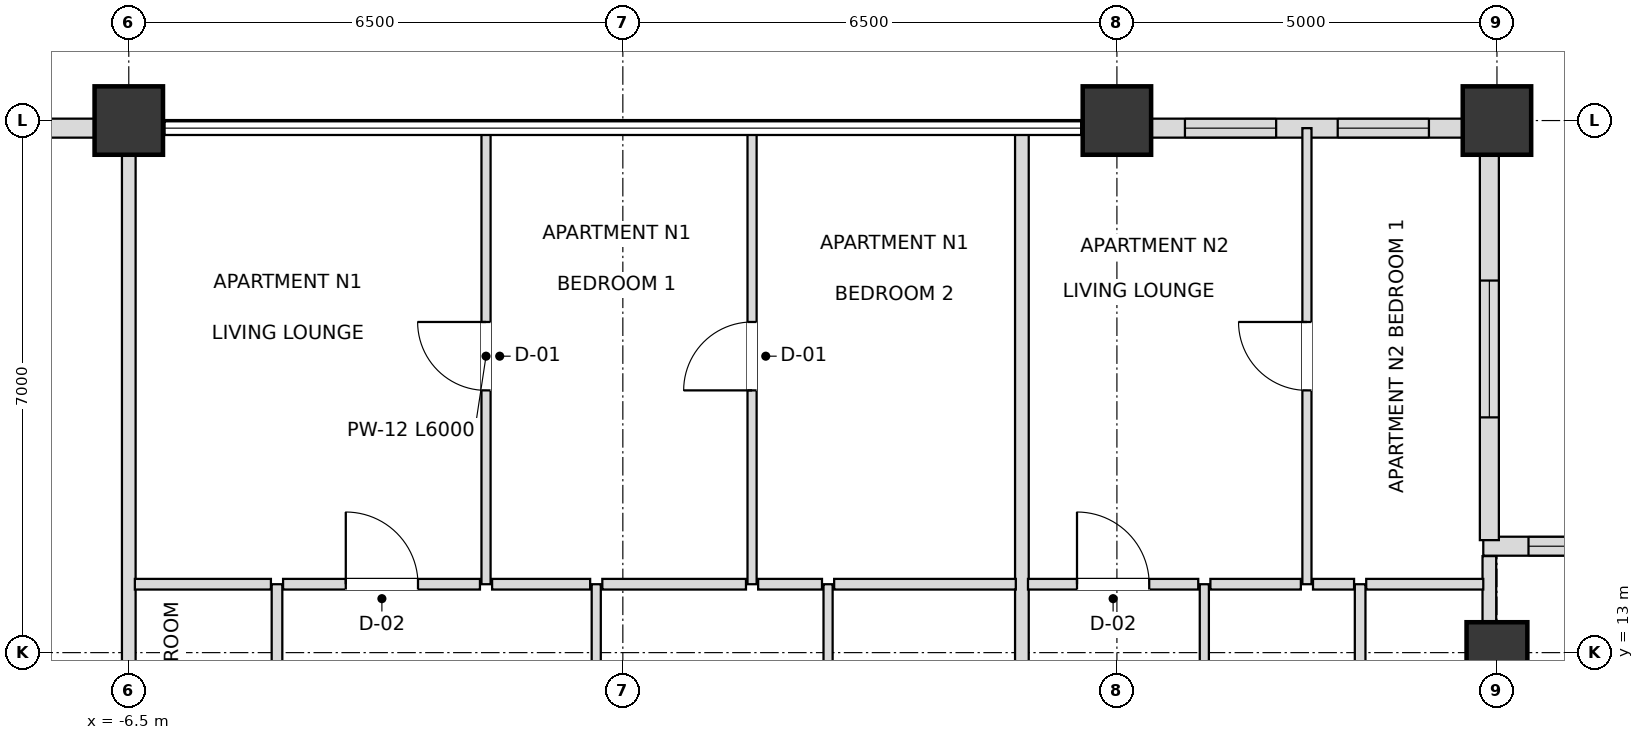
"""IFC4 building model, lengths in metres.
Left out: names, types, materials, properties, quantities, classifications, styles, units other than length and angle.
Written with IfcOpenShell. Run it as: python <this file> out.ifc"""

import sys

from ifc_helpers import new_model, si_unit, direction, frame, frame_2d, origin, origin_2d, place, context, subcontext, project, spatial, rectangle, extrude, element, fill, save


model = new_model("IFC4")
c1 = context("Model", 3, precision=1e-05, world=origin(), true_north=direction((0.0, 1.0)))
c2 = subcontext(c1, "Body", "Model", "MODEL_VIEW")
j1 = project(units=[si_unit("LENGTHUNIT", "METRE"), si_unit("PLANEANGLEUNIT", "RADIAN")], contexts=[c1])
p1 = place(None, origin())
s1 = spatial("IfcSite", under=j1, at=p1, CompositionType="ELEMENT")
p2 = place(p1, origin())
s2 = spatial("IfcBuilding", under=s1, at=p2, CompositionType="ELEMENT")
p3 = place(p2, frame((0.0, 0.0, 279.9)))
s3 = spatial("IfcBuildingStorey", under=s2, at=p3, CompositionType="ELEMENT", Elevation=279.9)
for number, where, z_axis, x_axis in (
    (1, (11.5, 20.0, 0.0), (0.0, 0.0, 1.0), (1.0, 0.0, 0.0)),
    (2, (6.5, 20.0, 0.0), (0.0, 0.0, 1.0), (1.0, 0.0, 0.0)),
    (3, (-6.5, 20.0, 0.0), (0.0, 0.0, 1.0), (1.0, 0.0, 0.0)),
):
    element("IfcColumn", number, at=place(p3, frame(where, z_axis=z_axis, x_axis=x_axis)), inside=s3, PredefinedType="USERDEFINED", context=c2, shape_type="SweptSolid", body=[
        extrude(rectangle(XDim=0.9, YDim=0.9, at=origin_2d()), origin(), (0.0, 0.0, 1.0), 3.6),
    ])
p4 = place(p3, frame((11.5, 13.0, 0.0), z_axis=(0.0, 0.0, 1.0), x_axis=(1.0, 0.0, 0.0)))
e4 = element("IfcColumn", 4, at=p4, inside=s3, PredefinedType="COLUMN", context=c2, shape_type="SweptSolid", body=[
    extrude(rectangle(XDim=0.8, YDim=0.8, at=origin_2d()), origin(), (0.0, 0.0, 1.0), 3.6),
])
p5 = place(p3, frame((11.055, 19.9, 0.0), z_axis=(0.0, 0.0, 1.0), x_axis=(-1.0, 0.0, 0.0)))
e5 = element("IfcWall", 5, at=p5, inside=s3, PredefinedType="SOLIDWALL", context=c2, shape_type="SweptSolid", body=[
    extrude(rectangle(XDim=4.11, YDim=0.25, at=frame_2d((2.055, 0.0))), origin(), (0.0, 0.0, 1.0), 2.748),
])
p6 = place(p5, frame((0.45, 0.0, 0.72)))
e6 = element("IfcOpeningElement", 6, at=p6, cuts=e5, PredefinedType="OPENING", context=c2, shape_type="SweptSolid", body=[
    extrude(rectangle(XDim=1.2, YDim=1.68, at=frame_2d((0.6, 0.84))), frame((0.0, 0.135, 0.0), z_axis=(0.0, -1.0, 0.0), x_axis=(1.0, 0.0, 0.0)), (0.0, 0.0, 1.0), 0.27),
])
p7 = place(p5, frame((2.46, 0.0, 0.72)))
e7 = element("IfcOpeningElement", 7, at=p7, cuts=e5, PredefinedType="OPENING", context=c2, shape_type="SweptSolid", body=[
    extrude(rectangle(XDim=1.2, YDim=1.68, at=frame_2d((0.6, 0.84))), frame((0.0, 0.135, 0.0), z_axis=(0.0, -1.0, 0.0), x_axis=(1.0, 0.0, 0.0)), (0.0, 0.0, 1.0), 0.27),
])
p8 = place(p3, frame((-6.945, 19.9, 0.0), z_axis=(0.0, 0.0, 1.0), x_axis=(-1.0, 0.0, 0.0)))
e8 = element("IfcWall", 8, at=p8, inside=s3, PredefinedType="SOLIDWALL", context=c2, shape_type="SweptSolid", body=[
    extrude(rectangle(XDim=4.11, YDim=0.25, at=frame_2d((2.055, 0.0))), origin(), (0.0, 0.0, 1.0), 2.748),
])
p9 = place(p8, frame((1.155, 0.0, 0.72)))
e9 = element("IfcOpeningElement", 9, at=p9, cuts=e8, PredefinedType="OPENING", context=c2, shape_type="SweptSolid", body=[
    extrude(rectangle(XDim=1.8, YDim=1.68, at=frame_2d((0.9, 0.84))), frame((0.0, 0.135, 0.0), z_axis=(0.0, -1.0, 0.0), x_axis=(1.0, 0.0, 0.0)), (0.0, 0.0, 1.0), 0.27),
])
p10 = place(p3, frame((16.98, 14.4, 0.0), z_axis=(0.0, 0.0, 1.0), x_axis=(-1.0, 0.0, 0.0)))
e10 = element("IfcWall", 10, at=p10, inside=s3, PredefinedType="SOLIDWALL", context=c2, shape_type="SweptSolid", body=[
    extrude(rectangle(XDim=5.66, YDim=0.25, at=frame_2d((2.83, 0.0))), origin(), (0.0, 0.0, 1.0), 2.748),
])
p11 = place(p10, frame((0.595, 0.0, 0.72)))
e11 = element("IfcOpeningElement", 11, at=p11, cuts=e10, PredefinedType="OPENING", context=c2, shape_type="SweptSolid", body=[
    extrude(rectangle(XDim=1.8, YDim=1.68, at=frame_2d((0.9, 0.84))), frame((0.0, 0.135, 0.0), z_axis=(0.0, -1.0, 0.0), x_axis=(1.0, 0.0, 0.0)), (0.0, 0.0, 1.0), 0.27),
])
p12 = place(p10, frame((3.265, 0.0, 0.72)))
e12 = element("IfcOpeningElement", 12, at=p12, cuts=e10, PredefinedType="OPENING", context=c2, shape_type="SweptSolid", body=[
    extrude(rectangle(XDim=1.8, YDim=1.68, at=frame_2d((0.9, 0.84))), frame((0.0, 0.135, 0.0), z_axis=(0.0, -1.0, 0.0), x_axis=(1.0, 0.0, 0.0)), (0.0, 0.0, 1.0), 0.27),
])
p13 = place(p3, frame((11.4, 14.48, 0.0), z_axis=(0.0, 0.0, 1.0), x_axis=(0.0, 1.0, 0.0)))
e13 = element("IfcWall", 13, at=p13, inside=s3, PredefinedType="SOLIDWALL", context=c2, shape_type="SweptSolid", body=[
    extrude(rectangle(XDim=5.34, YDim=0.25, at=frame_2d((2.67, 0.0))), origin(), (0.0, 0.0, 1.0), 2.748),
])
p14 = place(p13, frame((1.615, 0.0, 0.72)))
e14 = element("IfcOpeningElement", 14, at=p14, cuts=e13, PredefinedType="OPENING", context=c2, shape_type="SweptSolid", body=[
    extrude(rectangle(XDim=1.8, YDim=1.68, at=frame_2d((0.9, 0.84))), frame((0.0, 0.135, 0.0), z_axis=(0.0, -1.0, 0.0), x_axis=(1.0, 0.0, 0.0)), (0.0, 0.0, 1.0), 0.27),
])
p15 = place(p3, frame((-6.5, 9.2, 0.0), z_axis=(0.0, 0.0, 1.0), x_axis=(0.0, 1.0, 0.0)))
e15 = element("IfcWall", 15, at=p15, inside=s3, PredefinedType="PARTITIONING", context=c2, shape_type="SweptSolid", body=[
    extrude(rectangle(XDim=10.7, YDim=0.18, at=frame_2d((5.35, 0.0))), origin(), (0.0, 0.0, 1.0), 2.826),
])
p16 = place(p3, frame((-4.55, 9.2, 0.0), z_axis=(0.0, 0.0, 1.0), x_axis=(0.0, 1.0, 0.0)))
e16 = element("IfcWall", 16, at=p16, inside=s3, PredefinedType="PARTITIONING", context=c2, shape_type="SweptSolid", body=[
    extrude(rectangle(XDim=4.7, YDim=0.14, at=frame_2d((2.35, 0.0))), origin(), (0.0, 0.0, 1.0), 3.38),
])
p17 = place(p16, frame((1.9, 0.0, 0.0)))
e17 = element("IfcOpeningElement", 17, at=p17, cuts=e16, PredefinedType="OPENING", context=c2, shape_type="SweptSolid", body=[
    extrude(rectangle(XDim=0.9, YDim=2.1, at=frame_2d((0.45, 1.05))), frame((0.0, 0.08, 0.0), z_axis=(0.0, -1.0, 0.0), x_axis=(1.0, 0.0, 0.0)), (0.0, 0.0, 1.0), 0.16),
])
p18 = place(p3, frame((-1.8, 13.9, 0.0), z_axis=(0.0, 0.0, 1.0), x_axis=(0.0, 1.0, 0.0)))
e18 = element("IfcWall", 18, at=p18, inside=s3, PredefinedType="PARTITIONING", context=c2, shape_type="SweptSolid", body=[
    extrude(rectangle(XDim=6.0, YDim=0.12, at=frame_2d((3.0, 0.0))), origin(), (0.0, 0.0, 1.0), 3.018),
])
p19 = place(p18, frame((2.55, 0.0, 0.0)))
e19 = element("IfcOpeningElement", 19, at=p19, cuts=e18, PredefinedType="OPENING", context=c2, shape_type="SweptSolid", body=[
    extrude(rectangle(XDim=0.9, YDim=2.1, at=frame_2d((0.45, 1.05))), frame((0.0, 0.07, 0.0), z_axis=(0.0, -1.0, 0.0), x_axis=(1.0, 0.0, 0.0)), (0.0, 0.0, 1.0), 0.14),
])
p20 = place(p3, frame((-0.35, 9.2, 0.0), z_axis=(0.0, 0.0, 1.0), x_axis=(0.0, 1.0, 0.0)))
e20 = element("IfcWall", 20, at=p20, inside=s3, PredefinedType="PARTITIONING", context=c2, shape_type="SweptSolid", body=[
    extrude(rectangle(XDim=4.7, YDim=0.12, at=frame_2d((2.35, 0.0))), origin(), (0.0, 0.0, 1.0), 3.38),
])
p21 = place(p20, frame((1.875, 0.0, 0.0)))
e21 = element("IfcOpeningElement", 21, at=p21, cuts=e20, PredefinedType="OPENING", context=c2, shape_type="SweptSolid", body=[
    extrude(rectangle(XDim=0.95, YDim=2.1, at=frame_2d((0.475, 1.05))), frame((0.0, 0.07, 0.0), z_axis=(0.0, -1.0, 0.0), x_axis=(1.0, 0.0, 0.0)), (0.0, 0.0, 1.0), 0.14),
])
p22 = place(p3, frame((1.7, 13.9, 0.0), z_axis=(0.0, 0.0, 1.0), x_axis=(0.0, 1.0, 0.0)))
e22 = element("IfcWall", 22, at=p22, inside=s3, PredefinedType="PARTITIONING", context=c2, shape_type="SweptSolid", body=[
    extrude(rectangle(XDim=6.0, YDim=0.12, at=frame_2d((3.0, 0.0))), origin(), (0.0, 0.0, 1.0), 3.018),
])
p23 = place(p22, frame((2.55, 0.0, 0.0)))
e23 = element("IfcOpeningElement", 23, at=p23, cuts=e22, PredefinedType="OPENING", context=c2, shape_type="SweptSolid", body=[
    extrude(rectangle(XDim=0.9, YDim=2.1, at=frame_2d((0.45, 1.05))), frame((0.0, 0.07, 0.0), z_axis=(0.0, -1.0, 0.0), x_axis=(1.0, 0.0, 0.0)), (0.0, 0.0, 1.0), 0.14),
])
p24 = place(p3, frame((2.7, 9.2, 0.0), z_axis=(0.0, 0.0, 1.0), x_axis=(0.0, 1.0, 0.0)))
e24 = element("IfcWall", 24, at=p24, inside=s3, PredefinedType="PARTITIONING", context=c2, shape_type="SweptSolid", body=[
    extrude(rectangle(XDim=4.7, YDim=0.12, at=frame_2d((2.35, 0.0))), origin(), (0.0, 0.0, 1.0), 3.38),
])
p25 = place(p24, frame((1.9, 0.0, 0.0)))
e25 = element("IfcOpeningElement", 25, at=p25, cuts=e24, PredefinedType="OPENING", context=c2, shape_type="SweptSolid", body=[
    extrude(rectangle(XDim=0.9, YDim=2.1, at=frame_2d((0.45, 1.05))), frame((0.0, 0.07, 0.0), z_axis=(0.0, -1.0, 0.0), x_axis=(1.0, 0.0, 0.0)), (0.0, 0.0, 1.0), 0.14),
])
p26 = place(p3, frame((5.25, 9.2, 0.0), z_axis=(0.0, 0.0, 1.0), x_axis=(0.0, 1.0, 0.0)))
e26 = element("IfcWall", 26, at=p26, inside=s3, PredefinedType="PARTITIONING", context=c2, shape_type="SweptSolid", body=[
    extrude(rectangle(XDim=10.7, YDim=0.18, at=frame_2d((5.35, 0.0))), origin(), (0.0, 0.0, 1.0), 3.018),
])
p27 = place(p3, frame((7.65, 9.2, 0.0), z_axis=(0.0, 0.0, 1.0), x_axis=(0.0, 1.0, 0.0)))
e27 = element("IfcWall", 27, at=p27, inside=s3, PredefinedType="PARTITIONING", context=c2, shape_type="SweptSolid", body=[
    extrude(rectangle(XDim=4.7, YDim=0.12, at=frame_2d((2.35, 0.0))), origin(), (0.0, 0.0, 1.0), 2.826),
])
p28 = place(p27, frame((1.875, 0.0, 0.0)))
e28 = element("IfcOpeningElement", 28, at=p28, cuts=e27, PredefinedType="OPENING", context=c2, shape_type="SweptSolid", body=[
    extrude(rectangle(XDim=0.95, YDim=2.1, at=frame_2d((0.475, 1.05))), frame((0.0, 0.07, 0.0), z_axis=(0.0, -1.0, 0.0), x_axis=(1.0, 0.0, 0.0)), (0.0, 0.0, 1.0), 0.14),
])
p29 = place(p3, frame((9.0, 13.9, 0.0), z_axis=(0.0, 0.0, 1.0), x_axis=(0.0, 1.0, 0.0)))
e29 = element("IfcWall", 29, at=p29, inside=s3, PredefinedType="PARTITIONING", context=c2, shape_type="SweptSolid", body=[
    extrude(rectangle(XDim=6.0, YDim=0.12, at=frame_2d((3.0, 0.0))), origin(), (0.0, 0.0, 1.0), 3.38),
])
p30 = place(p29, frame((2.55, 0.0, 0.0)))
e30 = element("IfcOpeningElement", 30, at=p30, cuts=e29, PredefinedType="OPENING", context=c2, shape_type="SweptSolid", body=[
    extrude(rectangle(XDim=0.9, YDim=2.1, at=frame_2d((0.45, 1.05))), frame((0.0, 0.07, 0.0), z_axis=(0.0, -1.0, 0.0), x_axis=(1.0, 0.0, 0.0)), (0.0, 0.0, 1.0), 0.14),
])
p31 = place(p3, frame((9.7, 9.2, 0.0), z_axis=(0.0, 0.0, 1.0), x_axis=(0.0, 1.0, 0.0)))
e31 = element("IfcWall", 31, at=p31, inside=s3, PredefinedType="PARTITIONING", context=c2, shape_type="SweptSolid", body=[
    extrude(rectangle(XDim=4.7, YDim=0.14, at=frame_2d((2.35, 0.0))), origin(), (0.0, 0.0, 1.0), 2.826),
])
p32 = place(p31, frame((1.9, 0.0, 0.0)))
e32 = element("IfcOpeningElement", 32, at=p32, cuts=e31, PredefinedType="OPENING", context=c2, shape_type="SweptSolid", body=[
    extrude(rectangle(XDim=0.9, YDim=2.1, at=frame_2d((0.45, 1.05))), frame((0.0, 0.08, 0.0), z_axis=(0.0, -1.0, 0.0), x_axis=(1.0, 0.0, 0.0)), (0.0, 0.0, 1.0), 0.16),
])
p33 = place(p3, frame((11.4, 9.2, 0.0), z_axis=(0.0, 0.0, 1.0), x_axis=(0.0, 1.0, 0.0)))
e33 = element("IfcWall", 33, at=p33, inside=s3, PredefinedType="PARTITIONING", context=c2, shape_type="SweptSolid", body=[
    extrude(rectangle(XDim=5.07, YDim=0.18, at=frame_2d((2.535, 0.0))), origin(), (0.0, 0.0, 1.0), 2.748),
])
p34 = place(p3, frame((-6.42, 13.9, 0.0), z_axis=(0.0, 0.0, 1.0), x_axis=(1.0, 0.0, 0.0)))
e34 = element("IfcWall", 34, at=p34, inside=s3, PredefinedType="PARTITIONING", context=c2, shape_type="SweptSolid", body=[
    extrude(rectangle(XDim=1.79, YDim=0.14, at=frame_2d((0.895, 0.0))), origin(), (0.0, 0.0, 1.0), 3.38),
])
p35 = place(p3, frame((-4.47, 13.9, 0.0), z_axis=(0.0, 0.0, 1.0), x_axis=(1.0, 0.0, 0.0)))
e35 = element("IfcWall", 35, at=p35, inside=s3, PredefinedType="PARTITIONING", context=c2, shape_type="SweptSolid", body=[
    extrude(rectangle(XDim=2.59, YDim=0.14, at=frame_2d((1.295, 0.0))), origin(), (0.0, 0.0, 1.0), 3.38),
])
p36 = place(p35, frame((0.825, 0.0, 0.0)))
e36 = element("IfcOpeningElement", 36, at=p36, cuts=e35, PredefinedType="OPENING", context=c2, shape_type="SweptSolid", body=[
    extrude(rectangle(XDim=0.95, YDim=2.1, at=frame_2d((0.475, 1.05))), frame((0.0, 0.08, 0.0), z_axis=(0.0, -1.0, 0.0), x_axis=(1.0, 0.0, 0.0)), (0.0, 0.0, 1.0), 0.16),
])
p37 = place(p3, frame((-1.72, 13.9, 0.0), z_axis=(0.0, 0.0, 1.0), x_axis=(1.0, 0.0, 0.0)))
e37 = element("IfcWall", 37, at=p37, inside=s3, PredefinedType="PARTITIONING", context=c2, shape_type="SweptSolid", body=[
    extrude(rectangle(XDim=1.29, YDim=0.14, at=frame_2d((0.645, 0.0))), origin(), (0.0, 0.0, 1.0), 3.38),
])
p38 = place(p3, frame((-0.27, 13.9, 0.0), z_axis=(0.0, 0.0, 1.0), x_axis=(1.0, 0.0, 0.0)))
e38 = element("IfcWall", 38, at=p38, inside=s3, PredefinedType="PARTITIONING", context=c2, shape_type="SweptSolid", body=[
    extrude(rectangle(XDim=1.89, YDim=0.14, at=frame_2d((0.945, 0.0))), origin(), (0.0, 0.0, 1.0), 3.38),
])
p39 = place(p3, frame((1.78, 13.9, 0.0), z_axis=(0.0, 0.0, 1.0), x_axis=(1.0, 0.0, 0.0)))
e39 = element("IfcWall", 39, at=p39, inside=s3, PredefinedType="PARTITIONING", context=c2, shape_type="SweptSolid", body=[
    extrude(rectangle(XDim=0.84, YDim=0.14, at=frame_2d((0.42, 0.0))), origin(), (0.0, 0.0, 1.0), 3.38),
])
p40 = place(p3, frame((2.78, 13.9, 0.0), z_axis=(0.0, 0.0, 1.0), x_axis=(1.0, 0.0, 0.0)))
e40 = element("IfcWall", 40, at=p40, inside=s3, PredefinedType="PARTITIONING", context=c2, shape_type="SweptSolid", body=[
    extrude(rectangle(XDim=2.39, YDim=0.14, at=frame_2d((1.195, 0.0))), origin(), (0.0, 0.0, 1.0), 3.38),
])
p41 = place(p3, frame((5.33, 13.9, 0.0), z_axis=(0.0, 0.0, 1.0), x_axis=(1.0, 0.0, 0.0)))
e41 = element("IfcWall", 41, at=p41, inside=s3, PredefinedType="PARTITIONING", context=c2, shape_type="SweptSolid", body=[
    extrude(rectangle(XDim=2.24, YDim=0.14, at=frame_2d((1.12, 0.0))), origin(), (0.0, 0.0, 1.0), 2.826),
])
p42 = place(p41, frame((0.645, 0.0, 0.0)))
e42 = element("IfcOpeningElement", 42, at=p42, cuts=e41, PredefinedType="OPENING", context=c2, shape_type="SweptSolid", body=[
    extrude(rectangle(XDim=0.95, YDim=2.1, at=frame_2d((0.475, 1.05))), frame((0.0, 0.08, 0.0), z_axis=(0.0, -1.0, 0.0), x_axis=(1.0, 0.0, 0.0)), (0.0, 0.0, 1.0), 0.16),
])
p43 = place(p3, frame((7.73, 13.9, 0.0), z_axis=(0.0, 0.0, 1.0), x_axis=(1.0, 0.0, 0.0)))
e43 = element("IfcWall", 43, at=p43, inside=s3, PredefinedType="PARTITIONING", context=c2, shape_type="SweptSolid", body=[
    extrude(rectangle(XDim=1.19, YDim=0.14, at=frame_2d((0.595, 0.0))), origin(), (0.0, 0.0, 1.0), 3.38),
])
p44 = place(p3, frame((9.08, 13.9, 0.0), z_axis=(0.0, 0.0, 1.0), x_axis=(1.0, 0.0, 0.0)))
e44 = element("IfcWall", 44, at=p44, inside=s3, PredefinedType="PARTITIONING", context=c2, shape_type="SweptSolid", body=[
    extrude(rectangle(XDim=0.54, YDim=0.14, at=frame_2d((0.27, 0.0))), origin(), (0.0, 0.0, 1.0), 3.38),
])
p45 = place(p3, frame((9.78, 13.9, 0.0), z_axis=(0.0, 0.0, 1.0), x_axis=(1.0, 0.0, 0.0)))
e45 = element("IfcWall", 45, at=p45, inside=s3, PredefinedType="PARTITIONING", context=c2, shape_type="SweptSolid", body=[
    extrude(rectangle(XDim=1.54, YDim=0.14, at=frame_2d((0.77, 0.0))), origin(), (0.0, 0.0, 1.0), 3.38),
])
p46 = place(p6, origin())
e46 = element("IfcWindow", 46, at=p46, inside=s3, PartitioningType="SINGLE_PANEL", PredefinedType="WINDOW", context=c2, shape_type="SweptSolid", body=[
    extrude(rectangle(XDim=1.2, YDim=1.68, at=frame_2d((0.6, 0.84))), frame((0.0, 0.03, 0.0), z_axis=(0.0, -1.0, 0.0), x_axis=(1.0, 0.0, 0.0)), (0.0, 0.0, 1.0), 0.06),
])
fill(e6, e46)
p47 = place(p7, origin())
e47 = element("IfcWindow", 47, at=p47, inside=s3, PartitioningType="SINGLE_PANEL", PredefinedType="WINDOW", context=c2, shape_type="SweptSolid", body=[
    extrude(rectangle(XDim=1.2, YDim=1.68, at=frame_2d((0.6, 0.84))), frame((0.0, 0.03, 0.0), z_axis=(0.0, -1.0, 0.0), x_axis=(1.0, 0.0, 0.0)), (0.0, 0.0, 1.0), 0.06),
])
fill(e7, e47)
p48 = place(p12, origin())
e48 = element("IfcWindow", 48, at=p48, inside=s3, PartitioningType="SINGLE_PANEL", PredefinedType="WINDOW", context=c2, shape_type="SweptSolid", body=[
    extrude(rectangle(XDim=1.8, YDim=1.68, at=frame_2d((0.9, 0.84))), frame((0.0, 0.03, 0.0), z_axis=(0.0, -1.0, 0.0), x_axis=(1.0, 0.0, 0.0)), (0.0, 0.0, 1.0), 0.06),
])
fill(e12, e48)
p49 = place(p14, origin())
e49 = element("IfcWindow", 49, at=p49, inside=s3, PartitioningType="SINGLE_PANEL", PredefinedType="WINDOW", context=c2, shape_type="SweptSolid", body=[
    extrude(rectangle(XDim=1.8, YDim=1.68, at=frame_2d((0.9, 0.84))), frame((0.0, 0.03, 0.0), z_axis=(0.0, -1.0, 0.0), x_axis=(1.0, 0.0, 0.0)), (0.0, 0.0, 1.0), 0.06),
])
fill(e14, e49)
p50 = place(p36, origin())
e50 = element("IfcDoor", 50, at=p50, inside=s3, OperationType="SINGLE_SWING_LEFT", PredefinedType="DOOR", context=c2, shape_type="SweptSolid", body=[
    extrude(rectangle(XDim=0.95, YDim=2.1, at=frame_2d((0.475, 1.05))), frame((0.0, 0.025, 0.0), z_axis=(0.0, -1.0, 0.0), x_axis=(1.0, 0.0, 0.0)), (0.0, 0.0, 1.0), 0.05),
])
fill(e36, e50)
p51 = place(p19, origin())
e51 = element("IfcDoor", 51, at=p51, inside=s3, OperationType="SINGLE_SWING_RIGHT", PredefinedType="DOOR", context=c2, shape_type="SweptSolid", body=[
    extrude(rectangle(XDim=0.9, YDim=2.1, at=frame_2d((0.45, 1.05))), frame((0.0, 0.025, 0.0), z_axis=(0.0, -1.0, 0.0), x_axis=(1.0, 0.0, 0.0)), (0.0, 0.0, 1.0), 0.05),
])
fill(e19, e51)
p52 = place(p23, origin())
e52 = element("IfcDoor", 52, at=p52, inside=s3, OperationType="SINGLE_SWING_LEFT", PredefinedType="DOOR", context=c2, shape_type="SweptSolid", body=[
    extrude(rectangle(XDim=0.9, YDim=2.1, at=frame_2d((0.45, 1.05))), frame((0.0, 0.025, 0.0), z_axis=(0.0, -1.0, 0.0), x_axis=(1.0, 0.0, 0.0)), (0.0, 0.0, 1.0), 0.05),
])
fill(e23, e52)
p53 = place(p42, origin())
e53 = element("IfcDoor", 53, at=p53, inside=s3, OperationType="SINGLE_SWING_LEFT", PredefinedType="DOOR", context=c2, shape_type="SweptSolid", body=[
    extrude(rectangle(XDim=0.95, YDim=2.1, at=frame_2d((0.475, 1.05))), frame((0.0, 0.025, 0.0), z_axis=(0.0, -1.0, 0.0), x_axis=(1.0, 0.0, 0.0)), (0.0, 0.0, 1.0), 0.05),
])
fill(e42, e53)
p54 = place(p30, origin())
e54 = element("IfcDoor", 54, at=p54, inside=s3, OperationType="SINGLE_SWING_RIGHT", PredefinedType="DOOR", context=c2, shape_type="SweptSolid", body=[
    extrude(rectangle(XDim=0.9, YDim=2.1, at=frame_2d((0.45, 1.05))), frame((0.0, 0.025, 0.0), z_axis=(0.0, -1.0, 0.0), x_axis=(1.0, 0.0, 0.0)), (0.0, 0.0, 1.0), 0.05),
])
fill(e30, e54)
save(model, sys.argv[1])
